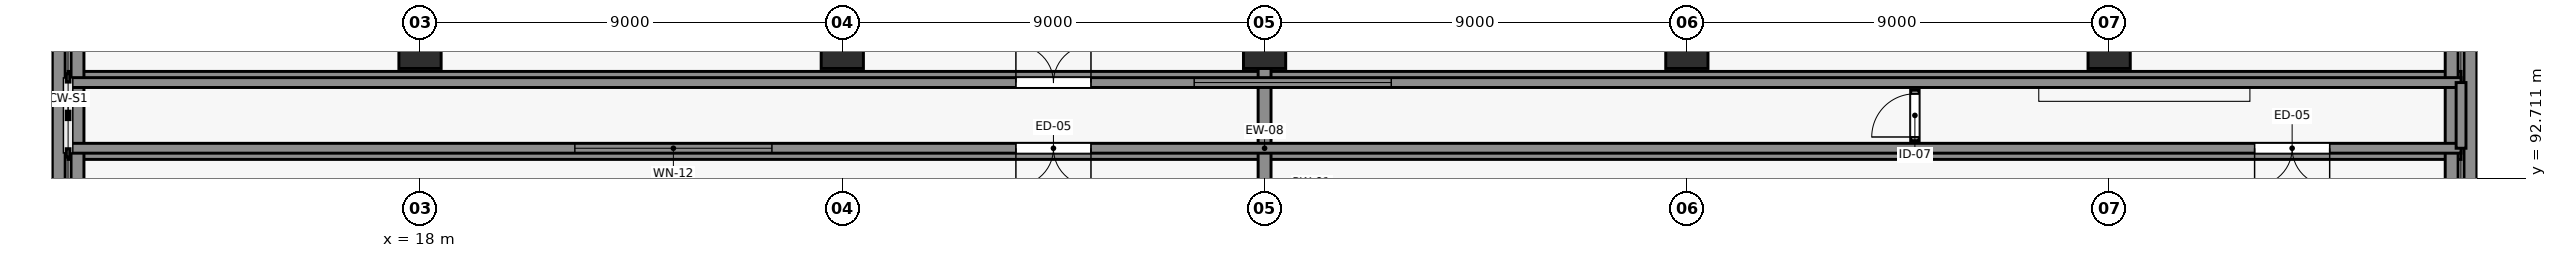
"""IFC4 building model, lengths in metres.
Left out: names, types, materials, properties, quantities, classifications, styles, units other than length and angle.
Written with IfcOpenShell. Run it as: python <this file> out.ifc"""

import sys

from ifc_helpers import new_model, si_unit, direction, frame, frame_2d, origin, origin_2d, place, context, subcontext, project, spatial, rectangle, extrude, element, fill, save


model = new_model("IFC4")
c1 = context("Model", 3, precision=1e-05, world=origin(), true_north=direction((0.0, 1.0)))
c2 = subcontext(c1, "Body", "Model", "MODEL_VIEW")
j1 = project(units=[si_unit("LENGTHUNIT", "METRE"), si_unit("PLANEANGLEUNIT", "RADIAN")], contexts=[c1])
p1 = place(None, origin())
s1 = spatial("IfcSite", under=j1, at=p1, CompositionType="ELEMENT")
p2 = place(p1, origin())
s2 = spatial("IfcBuilding", under=s1, at=p2, CompositionType="ELEMENT")
p3 = place(p2, origin())
s3 = spatial("IfcBuildingStorey", under=s2, at=p3, CompositionType="ELEMENT", Elevation=0.0)
for number, where, z_axis, x_axis in (
    (1, (10.5, 93.25, 0.0), (0.0, 0.0, 1.0), (1.0, 0.0, 0.0)),
    (2, (10.5, 94.85, 0.0), (0.0, 0.0, 1.0), (1.0, 0.0, 0.0)),
):
    element("IfcWall", number, at=place(p3, frame(where, z_axis=z_axis, x_axis=x_axis)), inside=s3, PredefinedType="SOLIDWALL", context=c2, shape_type="SweptSolid", body=[
        extrude(rectangle(XDim=51.0, YDim=0.275, at=frame_2d((25.5, 0.0))), origin(), (0.0, 0.0, 1.0), 0.675),
    ])
for number, where, z_axis, x_axis in (
    (3, (10.3, 92.25, 0.0), (0.0, 0.0, 1.0), (0.0, 1.0, 0.0)),
    (4, (10.7, 92.25, 0.0), (0.0, 0.0, 1.0), (0.0, 1.0, 0.0)),
    (5, (36.0, 92.25, 0.0), (0.0, 0.0, 1.0), (0.0, 1.0, 0.0)),
    (6, (61.3, 92.25, 0.0), (0.0, 0.0, 1.0), (0.0, 1.0, 0.0)),
    (7, (61.7, 92.25, 0.0), (0.0, 0.0, 1.0), (0.0, 1.0, 0.0)),
):
    element("IfcWall", number, at=place(p3, frame(where, z_axis=z_axis, x_axis=x_axis)), inside=s3, PredefinedType="SOLIDWALL", context=c2, shape_type="SweptSolid", body=[
        extrude(rectangle(XDim=3.6, YDim=0.275, at=frame_2d((1.8, 0.0))), origin(), (0.0, 0.0, 1.0), 0.675),
    ])
for number, where, z_axis, x_axis in (
    (8, (18.0, 95.5, 0.0), (0.0, 0.0, 1.0), (1.0, 0.0, 0.0)),
    (9, (27.0, 95.5, 0.0), (0.0, 0.0, 1.0), (1.0, 0.0, 0.0)),
    (10, (36.0, 95.5, 0.0), (0.0, 0.0, 1.0), (1.0, 0.0, 0.0)),
    (11, (45.0, 95.5, 0.0), (0.0, 0.0, 1.0), (1.0, 0.0, 0.0)),
    (12, (54.0, 95.5, 0.0), (0.0, 0.0, 1.0), (1.0, 0.0, 0.0)),
):
    element("IfcColumn", number, at=place(p3, frame(where, z_axis=z_axis, x_axis=x_axis)), inside=s3, PredefinedType="COLUMN", context=c2, shape_type="SweptSolid", body=[
        extrude(rectangle(XDim=0.9, YDim=0.9, at=origin_2d()), origin(), (0.0, 0.0, 1.0), 4.8),
    ])
p4 = place(p3, frame((61.5, 93.35, 0.915), z_axis=(0.0, 0.0, 1.0), x_axis=(-1.0, 0.0, 0.0)))
e13 = element("IfcWall", 13, at=p4, inside=s3, PredefinedType="SOLIDWALL", context=c2, shape_type="SweptSolid", body=[
    extrude(rectangle(XDim=51.0, YDim=0.21, at=frame_2d((25.5, 0.0))), origin(), (0.0, 0.0, 1.0), 3.185),
])
p5 = place(p4, frame((29.2, 0.0, 0.0)))
e14 = element("IfcOpeningElement", 14, at=p5, cuts=e13, PredefinedType="OPENING", context=c2, shape_type="SweptSolid", body=[
    extrude(rectangle(XDim=1.6, YDim=2.3, at=frame_2d((0.8, 1.15))), frame((0.0, 0.115, 0.0), z_axis=(0.0, -1.0, 0.0), x_axis=(1.0, 0.0, 0.0)), (0.0, 0.0, 1.0), 0.23),
])
p6 = place(p4, frame((2.8, 0.0, 0.0)))
e15 = element("IfcOpeningElement", 15, at=p6, cuts=e13, PredefinedType="OPENING", context=c2, shape_type="SweptSolid", body=[
    extrude(rectangle(XDim=1.6, YDim=2.3, at=frame_2d((0.8, 1.15))), frame((0.0, 0.115, 0.0), z_axis=(0.0, -1.0, 0.0), x_axis=(1.0, 0.0, 0.0)), (0.0, 0.0, 1.0), 0.23),
])
p7 = place(p4, frame((36.0, 0.0, 0.9)))
e16 = element("IfcOpeningElement", 16, at=p7, cuts=e13, PredefinedType="OPENING", context=c2, shape_type="SweptSolid", body=[
    extrude(rectangle(XDim=4.2, YDim=1.5, at=frame_2d((2.1, 0.75))), frame((0.0, 0.115, 0.0), z_axis=(0.0, -1.0, 0.0), x_axis=(1.0, 0.0, 0.0)), (0.0, 0.0, 1.0), 0.23),
])
p8 = place(p3, frame((10.5, 94.75, 0.915), z_axis=(0.0, 0.0, 1.0), x_axis=(1.0, 0.0, 0.0)))
e17 = element("IfcWall", 17, at=p8, inside=s3, PredefinedType="SOLIDWALL", context=c2, shape_type="SweptSolid", body=[
    extrude(rectangle(XDim=51.0, YDim=0.21, at=frame_2d((25.5, 0.0))), origin(), (0.0, 0.0, 1.0), 3.185),
])
p9 = place(p8, frame((20.2, 0.0, 0.0)))
e18 = element("IfcOpeningElement", 18, at=p9, cuts=e17, PredefinedType="OPENING", context=c2, shape_type="SweptSolid", body=[
    extrude(rectangle(XDim=1.6, YDim=2.3, at=frame_2d((0.8, 1.15))), frame((0.0, 0.115, 0.0), z_axis=(0.0, -1.0, 0.0), x_axis=(1.0, 0.0, 0.0)), (0.0, 0.0, 1.0), 0.23),
])
p10 = place(p8, frame((24.0, 0.0, 0.9)))
e19 = element("IfcOpeningElement", 19, at=p10, cuts=e17, PredefinedType="OPENING", context=c2, shape_type="SweptSolid", body=[
    extrude(rectangle(XDim=4.2, YDim=1.5, at=frame_2d((2.1, 0.75))), frame((0.0, 0.115, 0.0), z_axis=(0.0, -1.0, 0.0), x_axis=(1.0, 0.0, 0.0)), (0.0, 0.0, 1.0), 0.23),
])
p11 = place(p3, frame((61.5, 94.75, 0.915), z_axis=(0.0, 0.0, 1.0), x_axis=(0.0, -1.0, 0.0)))
e20 = element("IfcWall", 20, at=p11, inside=s3, PredefinedType="SOLIDWALL", context=c2, shape_type="SweptSolid", body=[
    extrude(rectangle(XDim=1.4, YDim=0.21, at=frame_2d((0.7, 0.0))), origin(), (0.0, 0.0, 1.0), 3.185),
])
p12 = place(p3, frame((49.86, 93.51, 0.915), z_axis=(0.0, 0.0, 1.0), x_axis=(0.0, 1.0, 0.0)))
e21 = element("IfcWall", 21, at=p12, inside=s3, PredefinedType="PARTITIONING", context=c2, shape_type="SweptSolid", body=[
    extrude(rectangle(XDim=1.08, YDim=0.18, at=frame_2d((0.54, 0.0))), origin(), (0.0, 0.0, 1.0), 3.435),
])
p13 = place(p12, frame((0.08, 0.0, 0.0)))
e22 = element("IfcOpeningElement", 22, at=p13, cuts=e21, PredefinedType="OPENING", context=c2, shape_type="SweptSolid", body=[
    extrude(rectangle(XDim=0.92, YDim=2.1, at=frame_2d((0.46, 1.05))), frame((0.0, 0.1, 0.0), z_axis=(0.0, -1.0, 0.0), x_axis=(1.0, 0.0, 0.0)), (0.0, 0.0, 1.0), 0.2),
])
p14 = place(p5, origin())
e23 = element("IfcDoor", 23, at=p14, inside=s3, OperationType="DOUBLE_DOOR_SINGLE_SWING", PredefinedType="DOOR", context=c2, shape_type="SweptSolid", body=[
    extrude(rectangle(XDim=1.6, YDim=2.3, at=frame_2d((0.8, 1.15))), frame((0.0, 0.025, 0.0), z_axis=(0.0, -1.0, 0.0), x_axis=(1.0, 0.0, 0.0)), (0.0, 0.0, 1.0), 0.05),
])
fill(e14, e23)
p15 = place(p6, origin())
e24 = element("IfcDoor", 24, at=p15, inside=s3, OperationType="DOUBLE_DOOR_SINGLE_SWING", PredefinedType="DOOR", context=c2, shape_type="SweptSolid", body=[
    extrude(rectangle(XDim=1.6, YDim=2.3, at=frame_2d((0.8, 1.15))), frame((0.0, 0.025, 0.0), z_axis=(0.0, -1.0, 0.0), x_axis=(1.0, 0.0, 0.0)), (0.0, 0.0, 1.0), 0.05),
])
fill(e15, e24)
p16 = place(p9, origin())
e25 = element("IfcDoor", 25, at=p16, inside=s3, OperationType="DOUBLE_DOOR_SINGLE_SWING", PredefinedType="DOOR", context=c2, shape_type="SweptSolid", body=[
    extrude(rectangle(XDim=1.6, YDim=2.3, at=frame_2d((0.8, 1.15))), frame((0.0, 0.025, 0.0), z_axis=(0.0, -1.0, 0.0), x_axis=(1.0, 0.0, 0.0)), (0.0, 0.0, 1.0), 0.05),
])
fill(e18, e25)
p17 = place(p7, origin())
e26 = element("IfcWindow", 26, at=p17, inside=s3, PartitioningType="SINGLE_PANEL", PredefinedType="WINDOW", context=c2, shape_type="SweptSolid", body=[
    extrude(rectangle(XDim=4.2, YDim=1.5, at=frame_2d((2.1, 0.75))), frame((0.0, 0.03, 0.0), z_axis=(0.0, -1.0, 0.0), x_axis=(1.0, 0.0, 0.0)), (0.0, 0.0, 1.0), 0.06),
])
fill(e16, e26)
p18 = place(p10, origin())
e27 = element("IfcWindow", 27, at=p18, inside=s3, PartitioningType="SINGLE_PANEL", PredefinedType="WINDOW", context=c2, shape_type="SweptSolid", body=[
    extrude(rectangle(XDim=4.2, YDim=1.5, at=frame_2d((2.1, 0.75))), frame((0.0, 0.03, 0.0), z_axis=(0.0, -1.0, 0.0), x_axis=(1.0, 0.0, 0.0)), (0.0, 0.0, 1.0), 0.06),
])
fill(e19, e27)
p19 = place(p13, origin())
e28 = element("IfcDoor", 28, at=p19, inside=s3, OperationType="SINGLE_SWING_LEFT", PredefinedType="DOOR", context=c2, shape_type="SweptSolid", body=[
    extrude(rectangle(XDim=0.92, YDim=2.1, at=frame_2d((0.46, 1.05))), frame((0.0, 0.025, 0.0), z_axis=(0.0, -1.0, 0.0), x_axis=(1.0, 0.0, 0.0)), (0.0, 0.0, 1.0), 0.05),
])
fill(e22, e28)
save(model, sys.argv[1])
